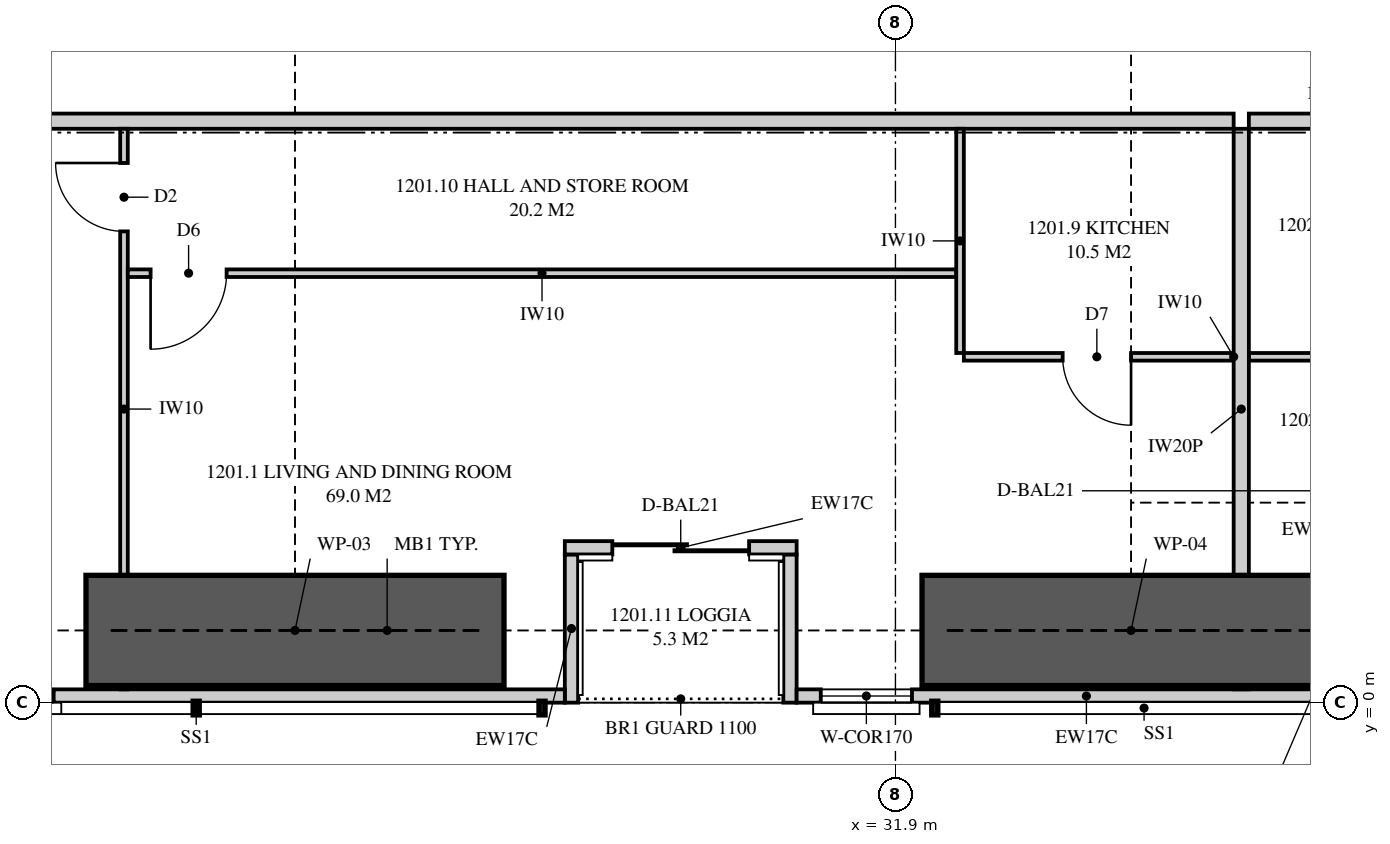
"""IFC4 building model, lengths in metres.
Left out: names, types, materials, properties, quantities, classifications, styles, units other than length and angle.
Written with IfcOpenShell. Run it as: python <this file> out.ifc"""

import sys

from ifc_helpers import new_model, si_unit, direction, frame, frame_2d, origin, place, context, subcontext, project, spatial, polyline, rectangle, outline, extrude, element, fill, save


model = new_model("IFC4")
c1 = context("Model", 3, precision=1e-05, world=origin(), true_north=direction((0.0, 1.0)))
c2 = subcontext(c1, "Body", "Model", "MODEL_VIEW")
j1 = project(units=[si_unit("LENGTHUNIT", "METRE"), si_unit("PLANEANGLEUNIT", "RADIAN")], contexts=[c1])
p1 = place(None, origin())
s1 = spatial("IfcSite", under=j1, at=p1, CompositionType="ELEMENT")
p2 = place(p1, origin())
s2 = spatial("IfcBuilding", under=s1, at=p2, CompositionType="ELEMENT")
p3 = place(p2, frame((0.0, 0.0, 47.8)))
s3 = spatial("IfcBuildingStorey", under=s2, at=p3, CompositionType="ELEMENT", Elevation=47.8)
p4 = place(p3, frame((5.051, 0.087, 0.0), z_axis=(0.0, 0.0, 1.0), x_axis=(1.0, 0.0, 0.0)))
e1 = element("IfcWall", 1, at=p4, inside=s3, PredefinedType="SOLIDWALL", context=c2, shape_type="SweptSolid", body=[
    extrude(outline(polyline([(0.0, 0.0), (22.499, 0.0), (22.499, 2.15), (7.949, 2.15), (7.949, 3.11), (7.793, 3.11), (7.793, 2.15), (7.745, 2.15), (7.745, 3.11), (0.0, 3.11), (0.0, 0.0)])), frame((0.0, 0.087, 0.0), z_axis=(0.0, -1.0, 0.0), x_axis=(1.0, 0.0, 0.0)), (0.0, 0.0, 1.0), 0.175),
])
p5 = place(p4, frame((3.234, 0.0, 0.4)))
e2 = element("IfcOpeningElement", 2, at=p5, cuts=e1, PredefinedType="OPENING", context=c2, shape_type="SweptSolid", body=[
    extrude(rectangle(XDim=1.8, YDim=1.7, at=frame_2d((0.9, 0.85))), frame((0.0, 0.097, 0.0), z_axis=(0.0, -1.0, 0.0), x_axis=(1.0, 0.0, 0.0)), (0.0, 0.0, 1.0), 0.195),
])
p6 = place(p4, frame((10.806, 0.0, 0.4)))
e3 = element("IfcOpeningElement", 3, at=p6, cuts=e1, PredefinedType="OPENING", context=c2, shape_type="SweptSolid", body=[
    extrude(rectangle(XDim=1.8, YDim=1.7, at=frame_2d((0.9, 0.85))), frame((0.0, 0.097, 0.0), z_axis=(0.0, -1.0, 0.0), x_axis=(1.0, 0.0, 0.0)), (0.0, 0.0, 1.0), 0.195),
])
p7 = place(p4, frame((13.974, 0.0, 0.4)))
e4 = element("IfcOpeningElement", 4, at=p7, cuts=e1, PredefinedType="OPENING", context=c2, shape_type="SweptSolid", body=[
    extrude(rectangle(XDim=1.8, YDim=1.7, at=frame_2d((0.9, 0.85))), frame((0.0, 0.097, 0.0), z_axis=(0.0, -1.0, 0.0), x_axis=(1.0, 0.0, 0.0)), (0.0, 0.0, 1.0), 0.195),
])
p8 = place(p3, frame((30.6, 0.087, 0.0), z_axis=(0.0, 0.0, 1.0), x_axis=(1.0, 0.0, 0.0)))
e5 = element("IfcWall", 5, at=p8, inside=s3, PredefinedType="SOLIDWALL", context=c2, shape_type="SweptSolid", body=[
    extrude(outline(polyline([(0.0, 0.0), (7.625, 0.0), (7.625, 3.11), (4.604, 3.11), (4.604, 2.15), (4.556, 2.15), (4.556, 3.11), (4.4, 3.11), (4.4, 2.15), (0.0, 2.15), (0.0, 0.0)])), frame((0.0, 0.087, 0.0), z_axis=(0.0, -1.0, 0.0), x_axis=(1.0, 0.0, 0.0)), (0.0, 0.0, 1.0), 0.175),
])
p9 = place(p8, frame((0.317, 0.0, 0.4)))
e6 = element("IfcOpeningElement", 6, at=p9, cuts=e5, PredefinedType="OPENING", context=c2, shape_type="SweptSolid", body=[
    extrude(rectangle(XDim=1.2, YDim=1.7, at=frame_2d((0.6, 0.85))), frame((0.0, 0.097, 0.0), z_axis=(0.0, -1.0, 0.0), x_axis=(1.0, 0.0, 0.0)), (0.0, 0.0, 1.0), 0.195),
])
p10 = place(p3, frame((27.55, 2.038, 0.0), z_axis=(0.0, 0.0, 1.0), x_axis=(1.0, 0.0, 0.0)))
e7 = element("IfcWall", 7, at=p10, inside=s3, PredefinedType="SOLIDWALL", context=c2, shape_type="SweptSolid", body=[
    extrude(rectangle(XDim=3.05, YDim=0.175, at=frame_2d((1.525, 0.0))), origin(), (0.0, 0.0, 1.0), 3.11),
])
p11 = place(p10, frame((0.625, 0.0, 0.0)))
e8 = element("IfcOpeningElement", 8, at=p11, cuts=e7, PredefinedType="OPENING", context=c2, shape_type="SweptSolid", body=[
    extrude(rectangle(XDim=1.8, YDim=2.1, at=frame_2d((0.9, 1.05))), frame((0.0, 0.097, 0.0), z_axis=(0.0, -1.0, 0.0), x_axis=(1.0, 0.0, 0.0)), (0.0, 0.0, 1.0), 0.195),
])
for number, where, z_axis, x_axis in (
    (9, (27.637, 0.0, 0.0), (0.0, 0.0, 1.0), (0.0, 1.0, 0.0)),
    (10, (30.512, 0.0, 0.0), (0.0, 0.0, 1.0), (0.0, 1.0, 0.0)),
):
    element("IfcWall", number, at=place(p3, frame(where, z_axis=z_axis, x_axis=x_axis)), inside=s3, PredefinedType="SOLIDWALL", context=c2, shape_type="SweptSolid", body=[
        extrude(outline(polyline([(0.0, 0.0), (1.95, 0.0), (1.95, 3.11), (1.75, 3.11), (1.75, 2.15), (0.15, 2.15), (0.15, 3.11), (0.0, 3.11), (0.0, 0.0)])), frame((0.0, 0.087, 0.0), z_axis=(0.0, -1.0, 0.0), x_axis=(1.0, 0.0, 0.0)), (0.0, 0.0, 1.0), 0.175),
    ])
p12 = place(p3, frame((36.45, 0.175, 0.0), z_axis=(0.0, 0.0, 1.0), x_axis=(0.0, 1.0, 0.0)))
e11 = element("IfcWall", 11, at=p12, inside=s3, PredefinedType="PARTITIONING", context=c2, shape_type="SweptSolid", body=[
    extrude(outline(polyline([(0.138, 3.11), (0.0, 3.11), (0.0, 0.0), (0.529, 0.0), (0.529, 0.504), (1.021, 0.504), (1.021, 0.0), (7.375, 0.0), (7.375, 3.11), (3.766, 3.11), (3.766, 2.51), (1.994, 2.51), (1.994, 2.15), (1.021, 2.15), (1.021, 1.646), (0.529, 1.646), (0.529, 2.15), (0.138, 2.15), (0.138, 3.11)])), frame((0.0, 0.1, 0.0), z_axis=(0.0, -1.0, 0.0), x_axis=(1.0, 0.0, 0.0)), (0.0, 0.0, 1.0), 0.2),
])
p13 = place(p3, frame((17.725, 7.65, 0.0), z_axis=(0.0, 0.0, 1.0), x_axis=(1.0, 0.0, 0.0)))
e12 = element("IfcWall", 12, at=p13, inside=s3, PredefinedType="PARTITIONING", context=c2, shape_type="SweptSolid", body=[
    extrude(outline(polyline([(0.0, 0.0), (18.625, 0.0), (18.625, 3.11), (17.612, 3.11), (17.612, 2.541), (16.938, 2.541), (16.938, 3.11), (6.612, 3.11), (6.612, 2.541), (5.938, 2.541), (5.938, 3.11), (0.0, 3.11), (0.0, 0.0)])), frame((0.0, 0.1, 0.0), z_axis=(0.0, -1.0, 0.0), x_axis=(1.0, 0.0, 0.0)), (0.0, 0.0, 1.0), 0.2),
])
p14 = place(p13, frame((1.0, 0.0, 0.0)))
e13 = element("IfcOpeningElement", 13, at=p14, cuts=e12, PredefinedType="OPENING", context=c2, shape_type="SweptSolid", body=[
    extrude(rectangle(XDim=1.05, YDim=2.2, at=frame_2d((0.525, 1.1))), frame((0.0, 0.11, 0.0), z_axis=(0.0, -1.0, 0.0), x_axis=(1.0, 0.0, 0.0)), (0.0, 0.0, 1.0), 0.22),
])
p15 = place(p3, frame((21.75, 0.175, 0.0), z_axis=(0.0, 0.0, 1.0), x_axis=(0.0, 1.0, 0.0)))
e14 = element("IfcWall", 14, at=p15, inside=s3, PredefinedType="PARTITIONING", context=c2, shape_type="SweptSolid", body=[
    extrude(outline(polyline([(0.0, 0.0), (7.375, 0.0), (7.375, 3.11), (1.635, 3.11), (1.635, 2.15), (0.0, 2.15), (0.0, 3.11), (0.0, 0.0)])), frame((0.0, 0.05, 0.0), z_axis=(0.0, -1.0, 0.0), x_axis=(1.0, 0.0, 0.0)), (0.0, 0.0, 1.0), 0.1),
])
p16 = place(p15, frame((6.025, 0.0, 0.0)))
e15 = element("IfcOpeningElement", 15, at=p16, cuts=e14, PredefinedType="OPENING", context=c2, shape_type="SweptSolid", body=[
    extrude(rectangle(XDim=0.9, YDim=2.1, at=frame_2d((0.45, 1.05))), frame((0.0, 0.06, 0.0), z_axis=(0.0, -1.0, 0.0), x_axis=(1.0, 0.0, 0.0)), (0.0, 0.0, 1.0), 0.12),
])
p17 = place(p3, frame((32.8, 4.55, 0.0), z_axis=(0.0, 0.0, 1.0), x_axis=(1.0, 0.0, 0.0)))
e16 = element("IfcWall", 16, at=p17, inside=s3, PredefinedType="PARTITIONING", context=c2, shape_type="SweptSolid", body=[
    extrude(outline(polyline([(0.0, 0.0), (3.55, 0.0), (3.55, 3.11), (2.487, 3.11), (2.487, 2.541), (1.913, 2.541), (1.913, 3.11), (0.0, 3.11), (0.0, 0.0)])), frame((0.0, 0.05, 0.0), z_axis=(0.0, -1.0, 0.0), x_axis=(1.0, 0.0, 0.0)), (0.0, 0.0, 1.0), 0.1),
])
p18 = place(p17, frame((1.3, 0.0, 0.0)))
e17 = element("IfcOpeningElement", 17, at=p18, cuts=e16, PredefinedType="OPENING", context=c2, shape_type="SweptSolid", body=[
    extrude(rectangle(XDim=0.9, YDim=2.1, at=frame_2d((0.45, 1.05))), frame((0.0, 0.06, 0.0), z_axis=(0.0, -1.0, 0.0), x_axis=(1.0, 0.0, 0.0)), (0.0, 0.0, 1.0), 0.12),
])
p19 = place(p3, frame((32.75, 4.6, 0.0), z_axis=(0.0, 0.0, 1.0), x_axis=(0.0, 1.0, 0.0)))
e18 = element("IfcWall", 18, at=p19, inside=s3, PredefinedType="PARTITIONING", context=c2, shape_type="SweptSolid", body=[
    extrude(rectangle(XDim=2.95, YDim=0.1, at=frame_2d((1.475, 0.0))), origin(), (0.0, 0.0, 1.0), 3.11),
])
p20 = place(p3, frame((21.8, 5.65, 0.0), z_axis=(0.0, 0.0, 1.0), x_axis=(1.0, 0.0, 0.0)))
e19 = element("IfcWall", 19, at=p20, inside=s3, PredefinedType="PARTITIONING", context=c2, shape_type="SweptSolid", body=[
    extrude(outline(polyline([(0.0, 0.0), (10.9, 0.0), (10.9, 3.11), (2.487, 3.11), (2.487, 2.541), (1.913, 2.541), (1.913, 3.11), (0.0, 3.11), (0.0, 0.0)])), frame((0.0, 0.05, 0.0), z_axis=(0.0, -1.0, 0.0), x_axis=(1.0, 0.0, 0.0)), (0.0, 0.0, 1.0), 0.1),
])
p21 = place(p20, frame((0.3, 0.0, 0.0)))
e20 = element("IfcOpeningElement", 20, at=p21, cuts=e19, PredefinedType="OPENING", context=c2, shape_type="SweptSolid", body=[
    extrude(rectangle(XDim=1.0, YDim=2.1, at=frame_2d((0.5, 1.05))), frame((0.0, 0.06, 0.0), z_axis=(0.0, -1.0, 0.0), x_axis=(1.0, 0.0, 0.0)), (0.0, 0.0, 1.0), 0.12),
])
p22 = place(p3, frame((36.55, 7.65, 0.0), z_axis=(0.0, 0.0, 1.0), x_axis=(1.0, 0.0, 0.0)))
e21 = element("IfcWall", 21, at=p22, inside=s3, PredefinedType="PARTITIONING", context=c2, shape_type="SweptSolid", body=[
    extrude(outline(polyline([(0.0, 0.0), (9.45, 0.0), (9.45, 3.11), (8.554, 3.11), (8.554, 2.15), (6.71, 2.15), (6.71, 3.11), (0.0, 3.11), (0.0, 0.0)])), frame((0.0, 0.1, 0.0), z_axis=(0.0, -1.0, 0.0), x_axis=(1.0, 0.0, 0.0)), (0.0, 0.0, 1.0), 0.2),
])
p23 = place(p22, frame((1.45, 0.0, 0.0)))
e22 = element("IfcOpeningElement", 22, at=p23, cuts=e21, PredefinedType="OPENING", context=c2, shape_type="SweptSolid", body=[
    extrude(rectangle(XDim=1.05, YDim=2.2, at=frame_2d((0.525, 1.1))), frame((0.0, 0.11, 0.0), z_axis=(0.0, -1.0, 0.0), x_axis=(1.0, 0.0, 0.0)), (0.0, 0.0, 1.0), 0.22),
])
p24 = place(p3, frame((36.55, 4.55, 0.0), z_axis=(0.0, 0.0, 1.0), x_axis=(1.0, 0.0, 0.0)))
e23 = element("IfcWall", 23, at=p24, inside=s3, PredefinedType="PARTITIONING", context=c2, shape_type="SweptSolid", body=[
    extrude(rectangle(XDim=3.55, YDim=0.1, at=frame_2d((1.775, 0.0))), origin(), (0.0, 0.0, 1.0), 3.11),
])
p25 = place(p24, frame((1.35, 0.0, 0.0)))
e24 = element("IfcOpeningElement", 24, at=p25, cuts=e23, PredefinedType="OPENING", context=c2, shape_type="SweptSolid", body=[
    extrude(rectangle(XDim=0.9, YDim=2.1, at=frame_2d((0.45, 1.05))), frame((0.0, 0.06, 0.0), z_axis=(0.0, -1.0, 0.0), x_axis=(1.0, 0.0, 0.0)), (0.0, 0.0, 1.0), 0.12),
])
for number, where, z_axis, x_axis in (
    (25, (21.25, 0.95, 0.0), (0.0, 0.0, 1.0), (1.0, 0.0, 0.0)),
    (26, (32.25, 0.95, 0.0), (0.0, 0.0, 1.0), (1.0, 0.0, 0.0)),
):
    element("IfcWall", number, at=place(p3, frame(where, z_axis=z_axis, x_axis=x_axis)), inside=s3, PredefinedType="SHEAR", context=c2, shape_type="SweptSolid", body=[
        extrude(rectangle(XDim=5.5, YDim=1.45, at=frame_2d((2.75, 0.0))), origin(), (0.0, 0.0, 1.0), 3.35),
    ])
p26 = place(p7, origin())
e27 = element("IfcWindow", 27, at=p26, inside=s3, PartitioningType="SINGLE_PANEL", PredefinedType="WINDOW", context=c2, shape_type="SweptSolid", body=[
    extrude(rectangle(XDim=1.8, YDim=1.7, at=frame_2d((0.9, 0.85))), frame((0.0, 0.03, 0.0), z_axis=(0.0, -1.0, 0.0), x_axis=(1.0, 0.0, 0.0)), (0.0, 0.0, 1.0), 0.06),
])
fill(e4, e27)
p27 = place(p11, origin())
e28 = element("IfcDoor", 28, at=p27, inside=s3, OperationType="SLIDING_TO_LEFT", PredefinedType="DOOR", context=c2, shape_type="SweptSolid", body=[
    extrude(rectangle(XDim=1.8, YDim=2.1, at=frame_2d((0.9, 1.05))), frame((0.0, 0.025, 0.0), z_axis=(0.0, -1.0, 0.0), x_axis=(1.0, 0.0, 0.0)), (0.0, 0.0, 1.0), 0.05),
])
fill(e8, e28)
p28 = place(p9, origin())
e29 = element("IfcWindow", 29, at=p28, inside=s3, PartitioningType="SINGLE_PANEL", PredefinedType="WINDOW", context=c2, shape_type="SweptSolid", body=[
    extrude(rectangle(XDim=1.2, YDim=1.7, at=frame_2d((0.6, 0.85))), frame((0.0, 0.03, 0.0), z_axis=(0.0, -1.0, 0.0), x_axis=(1.0, 0.0, 0.0)), (0.0, 0.0, 1.0), 0.06),
])
fill(e6, e29)
p29 = place(p16, origin())
e30 = element("IfcDoor", 30, at=p29, inside=s3, OperationType="SINGLE_SWING_RIGHT", PredefinedType="DOOR", context=c2, shape_type="SweptSolid", body=[
    extrude(rectangle(XDim=0.9, YDim=2.1, at=frame_2d((0.45, 1.05))), frame((0.0, 0.025, 0.0), z_axis=(0.0, -1.0, 0.0), x_axis=(1.0, 0.0, 0.0)), (0.0, 0.0, 1.0), 0.05),
])
fill(e15, e30)
p30 = place(p18, frame((0.9, 0.0, 0.0), z_axis=(0.0, 0.0, 1.0), x_axis=(-1.0, 0.0, 0.0)))
e31 = element("IfcDoor", 31, at=p30, inside=s3, OperationType="SINGLE_SWING_LEFT", PredefinedType="DOOR", context=c2, shape_type="SweptSolid", body=[
    extrude(rectangle(XDim=0.9, YDim=2.1, at=frame_2d((0.45, 1.05))), frame((0.0, 0.025, 0.0), z_axis=(0.0, -1.0, 0.0), x_axis=(1.0, 0.0, 0.0)), (0.0, 0.0, 1.0), 0.05),
])
fill(e17, e31)
p31 = place(p21, frame((1.0, 0.0, 0.0), z_axis=(0.0, 0.0, 1.0), x_axis=(-1.0, 0.0, 0.0)))
e32 = element("IfcDoor", 32, at=p31, inside=s3, OperationType="SINGLE_SWING_RIGHT", PredefinedType="DOOR", context=c2, shape_type="SweptSolid", body=[
    extrude(rectangle(XDim=1.0, YDim=2.1, at=frame_2d((0.5, 1.05))), frame((0.0, 0.025, 0.0), z_axis=(0.0, -1.0, 0.0), x_axis=(1.0, 0.0, 0.0)), (0.0, 0.0, 1.0), 0.05),
])
fill(e20, e32)
save(model, sys.argv[1])
